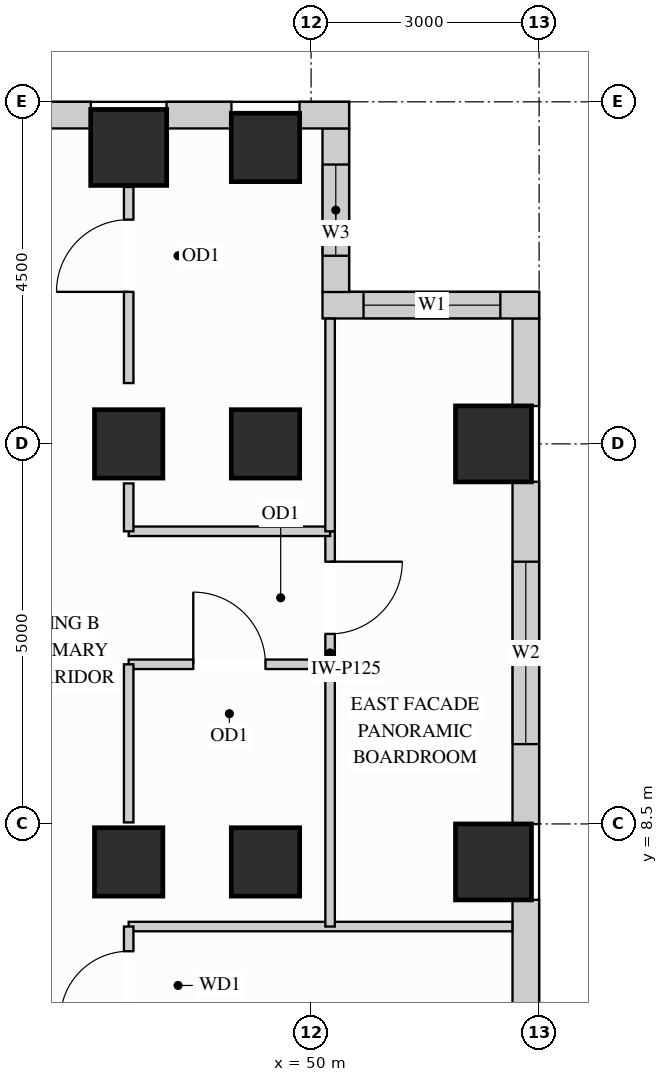
"""IFC4 building model, lengths in metres.
Left out: names, types, materials, properties, quantities, classifications, styles, units other than length and angle.
Written with IfcOpenShell. Run it as: python <this file> out.ifc"""

import sys

from ifc_helpers import new_model, si_unit, direction, frame, frame_2d, origin, origin_2d, place, context, subcontext, project, spatial, rectangle, extrude, source, transform, mapped, element, fill, save


model = new_model("IFC4")
c1 = context("Model", 3, precision=1e-05, world=origin(), true_north=direction((0.0, 1.0)))
c2 = subcontext(c1, "Body", "Model", "MODEL_VIEW")
j1 = project(units=[si_unit("LENGTHUNIT", "METRE"), si_unit("PLANEANGLEUNIT", "RADIAN")], contexts=[c1])
p1 = place(None, origin())
s1 = spatial("IfcSite", under=j1, at=p1, CompositionType="ELEMENT")
p2 = place(p1, origin())
s2 = spatial("IfcBuilding", under=s1, at=p2, CompositionType="ELEMENT")
p3 = place(p2, frame((0.0, 0.0, 146.7)))
s3 = spatial("IfcBuildingStorey", under=s2, at=p3, CompositionType="ELEMENT", Elevation=146.7)
m1 = source(origin(), c2, "Body", "SweptSolid", [
    extrude(rectangle(XDim=0.9, YDim=0.9, at=origin_2d()), origin(), (0.0, 0.0, 1.0), 3.4),
])
for number, where, z_axis, x_axis in (
    (1, (47.6, 13.5, 0.0), (0.0, 0.0, 1.0), (1.0, 0.0, 0.0)),
    (2, (47.6, 8.0, 0.0), (0.0, 0.0, 1.0), (1.0, 0.0, 0.0)),
    (3, (49.4, 13.5, 0.0), (0.0, 0.0, 1.0), (1.0, 0.0, 0.0)),
    (4, (49.4, 17.4, 0.0), (0.0, 0.0, 1.0), (1.0, 0.0, 0.0)),
    (5, (49.4, 8.0, 0.0), (0.0, 0.0, 1.0), (1.0, 0.0, 0.0)),
):
    element("IfcColumn", number, at=place(p3, frame(where, z_axis=z_axis, x_axis=x_axis)), inside=s3, PredefinedType="COLUMN", context=c2, shape_type="MappedRepresentation", body=[
        mapped(m1, transform((0.0, 0.0, 0.0), x_axis=(1.0, 0.0, 0.0), y_axis=(0.0, 1.0, 0.0), z_axis=(0.0, 0.0, 1.0))),
    ])
m2 = source(origin(), c2, "Body", "SweptSolid", [
    extrude(rectangle(XDim=1.0, YDim=1.0, at=origin_2d()), origin(), (0.0, 0.0, 1.0), 3.4),
])
for number, where, z_axis, x_axis in (
    (6, (47.6, 17.4, 0.0), (0.0, 0.0, 1.0), (1.0, 0.0, 0.0)),
    (7, (52.4, 13.5, 0.0), (0.0, 0.0, 1.0), (1.0, 0.0, 0.0)),
    (8, (52.4, 8.0, 0.0), (0.0, 0.0, 1.0), (1.0, 0.0, 0.0)),
):
    element("IfcColumn", number, at=place(p3, frame(where, z_axis=z_axis, x_axis=x_axis)), inside=s3, PredefinedType="COLUMN", context=c2, shape_type="MappedRepresentation", body=[
        mapped(m2, transform((0.0, 0.0, 0.0), x_axis=(1.0, 0.0, 0.0), y_axis=(0.0, 1.0, 0.0), z_axis=(0.0, 0.0, 1.0))),
    ])
m3 = source(origin(), c2, "Body", "SweptSolid", [
    extrude(rectangle(XDim=3.504, YDim=0.35, at=frame_2d((1.752, 0.0))), origin(), (0.0, 0.0, 1.0), 2.612),
])
p4 = place(p3, frame((52.825, 3.998, 0.0), z_axis=(0.0, 0.0, 1.0), x_axis=(0.0, 1.0, 0.0)))
e9 = element("IfcWall", 9, at=p4, inside=s3, PredefinedType="SOLIDWALL", context=c2, shape_type="MappedRepresentation", body=[
    mapped(m3, transform((0.0, 0.0, 0.0), x_axis=(1.0, 0.0, 0.0), y_axis=(0.0, 1.0, 0.0), z_axis=(0.0, 0.0, 1.0))),
])
p5 = place(p3, frame((52.825, 8.498, 0.0), z_axis=(0.0, 0.0, 1.0), x_axis=(0.0, 1.0, 0.0)))
e10 = element("IfcWall", 10, at=p5, inside=s3, PredefinedType="SOLIDWALL", context=c2, shape_type="SweptSolid", body=[
    extrude(rectangle(XDim=4.504, YDim=0.35, at=frame_2d((2.252, 0.0))), origin(), (0.0, 0.0, 1.0), 2.612),
])
p6 = place(p5, frame((1.052, 0.0, 0.78)))
e11 = element("IfcOpeningElement", 11, at=p6, cuts=e10, PredefinedType="OPENING", context=c2, shape_type="SweptSolid", body=[
    extrude(rectangle(XDim=2.4, YDim=1.652, at=frame_2d((1.2, 0.826))), frame((0.0, 0.185, 0.0), z_axis=(0.0, -1.0, 0.0), x_axis=(1.0, 0.0, 0.0)), (0.0, 0.0, 1.0), 0.37),
])
m4 = source(origin(), c2, "Body", "SweptSolid", [
    extrude(rectangle(XDim=1.154, YDim=0.35, at=frame_2d((0.577, 0.0))), origin(), (0.0, 0.0, 1.0), 3.385),
])
p7 = place(p3, frame((52.825, 13.998, 0.0), z_axis=(0.0, 0.0, 1.0), x_axis=(0.0, 1.0, 0.0)))
e12 = element("IfcWall", 12, at=p7, inside=s3, PredefinedType="SOLIDWALL", context=c2, shape_type="MappedRepresentation", body=[
    mapped(m4, transform((0.0, 0.0, 0.0), x_axis=(1.0, 0.0, 0.0), y_axis=(0.0, 1.0, 0.0), z_axis=(0.0, 0.0, 1.0))),
])
p8 = place(p3, frame((53.0, 15.325, 0.0), z_axis=(0.0, 0.0, 1.0), x_axis=(-1.0, 0.0, 0.0)))
e13 = element("IfcWall", 13, at=p8, inside=s3, PredefinedType="SOLIDWALL", context=c2, shape_type="SweptSolid", body=[
    extrude(rectangle(XDim=2.85, YDim=0.35, at=frame_2d((1.425, 0.0))), origin(), (0.0, 0.0, 1.0), 3.385),
])
p9 = place(p8, frame((0.51, 0.0, 0.78)))
e14 = element("IfcOpeningElement", 14, at=p9, cuts=e13, PredefinedType="OPENING", context=c2, shape_type="SweptSolid", body=[
    extrude(rectangle(XDim=1.8, YDim=2.1, at=frame_2d((0.9, 1.05))), frame((0.0, 0.185, 0.0), z_axis=(0.0, -1.0, 0.0), x_axis=(1.0, 0.0, 0.0)), (0.0, 0.0, 1.0), 0.37),
])
p10 = place(p3, frame((50.325, 15.498, 0.0), z_axis=(0.0, 0.0, 1.0), x_axis=(0.0, 1.0, 0.0)))
e15 = element("IfcWall", 15, at=p10, inside=s3, PredefinedType="SOLIDWALL", context=c2, shape_type="SweptSolid", body=[
    extrude(rectangle(XDim=2.154, YDim=0.35, at=frame_2d((1.077, 0.0))), origin(), (0.0, 0.0, 1.0), 3.385),
])
p11 = place(p10, frame((0.477, 0.0, 0.78)))
e16 = element("IfcOpeningElement", 16, at=p11, cuts=e15, PredefinedType="OPENING", context=c2, shape_type="SweptSolid", body=[
    extrude(rectangle(XDim=1.2, YDim=2.1, at=frame_2d((0.6, 1.05))), frame((0.0, 0.185, 0.0), z_axis=(0.0, -1.0, 0.0), x_axis=(1.0, 0.0, 0.0)), (0.0, 0.0, 1.0), 0.37),
])
m5 = source(origin(), c2, "Body", "SweptSolid", [
    extrude(rectangle(XDim=0.652, YDim=0.35, at=frame_2d((0.326, 0.0))), origin(), (0.0, 0.0, 1.0), 3.385),
])
p12 = place(p3, frame((50.5, 17.825, 0.0), z_axis=(0.0, 0.0, 1.0), x_axis=(-1.0, 0.0, 0.0)))
e17 = element("IfcWall", 17, at=p12, inside=s3, PredefinedType="SOLIDWALL", context=c2, shape_type="MappedRepresentation", body=[
    mapped(m5, transform((0.0, 0.0, 0.0), x_axis=(1.0, 0.0, 0.0), y_axis=(0.0, 1.0, 0.0), z_axis=(0.0, 0.0, 1.0))),
])
m6 = source(origin(), c2, "Body", "SweptSolid", [
    extrude(rectangle(XDim=0.854, YDim=0.35, at=frame_2d((0.427, 0.0))), origin(), (0.0, 0.0, 1.0), 3.385),
])
p13 = place(p3, frame((48.952, 17.825, 0.0), z_axis=(0.0, 0.0, 1.0), x_axis=(-1.0, 0.0, 0.0)))
e18 = element("IfcWall", 18, at=p13, inside=s3, PredefinedType="SOLIDWALL", context=c2, shape_type="MappedRepresentation", body=[
    mapped(m6, transform((0.0, 0.0, 0.0), x_axis=(1.0, 0.0, 0.0), y_axis=(0.0, 1.0, 0.0), z_axis=(0.0, 0.0, 1.0))),
])
p14 = place(p3, frame((47.102, 17.825, 0.0), z_axis=(0.0, 0.0, 1.0), x_axis=(-1.0, 0.0, 0.0)))
e19 = element("IfcWall", 19, at=p14, inside=s3, PredefinedType="SOLIDWALL", context=c2, shape_type="SweptSolid", body=[
    extrude(rectangle(XDim=6.604, YDim=0.35, at=frame_2d((3.302, 0.0))), origin(), (0.0, 0.0, 1.0), 2.612),
])
p15 = place(p14, frame((1.849, 0.0, 0.78)))
e20 = element("IfcOpeningElement", 20, at=p15, cuts=e19, PredefinedType="OPENING", context=c2, shape_type="SweptSolid", body=[
    extrude(rectangle(XDim=1.8, YDim=1.652, at=frame_2d((0.9, 0.826))), frame((0.0, 0.185, 0.0), z_axis=(0.0, -1.0, 0.0), x_axis=(1.0, 0.0, 0.0)), (0.0, 0.0, 1.0), 0.37),
])
p16 = place(p14, frame((4.067, 0.0, 0.78)))
e21 = element("IfcOpeningElement", 21, at=p16, cuts=e19, PredefinedType="OPENING", context=c2, shape_type="SweptSolid", body=[
    extrude(rectangle(XDim=1.8, YDim=1.652, at=frame_2d((0.9, 0.826))), frame((0.0, 0.185, 0.0), z_axis=(0.0, -1.0, 0.0), x_axis=(1.0, 0.0, 0.0)), (0.0, 0.0, 1.0), 0.37),
])
p17 = place(p3, frame((50.25, 10.6, 0.0), z_axis=(0.0, 0.0, 1.0), x_axis=(0.0, 1.0, 0.0)))
e22 = element("IfcWall", 22, at=p17, inside=s3, PredefinedType="PARTITIONING", context=c2, shape_type="SweptSolid", body=[
    extrude(rectangle(XDim=1.75, YDim=0.125, at=frame_2d((0.875, 0.0))), origin(), (0.0, 0.0, 1.0), 3.385),
])
p18 = place(p17, frame((0.4, 0.0, 0.0)))
e23 = element("IfcOpeningElement", 23, at=p18, cuts=e22, PredefinedType="OPENING", context=c2, shape_type="SweptSolid", body=[
    extrude(rectangle(XDim=0.95, YDim=2.15, at=frame_2d((0.475, 1.075))), frame((0.0, 0.073, 0.0), z_axis=(0.0, -1.0, 0.0), x_axis=(1.0, 0.0, 0.0)), (0.0, 0.0, 1.0), 0.145),
])
m7 = source(origin(), c2, "Body", "SweptSolid", [
    extrude(rectangle(XDim=5.048, YDim=0.125, at=frame_2d((2.524, 0.0))), origin(), (0.0, 0.0, 1.0), 3.385),
])
p19 = place(p3, frame((47.6, 7.15, 0.0), z_axis=(0.0, 0.0, 1.0), x_axis=(1.0, 0.0, 0.0)))
e24 = element("IfcWall", 24, at=p19, inside=s3, PredefinedType="PARTITIONING", context=c2, shape_type="MappedRepresentation", body=[
    mapped(m7, transform((0.0, 0.0, 0.0), x_axis=(1.0, 0.0, 0.0), y_axis=(0.0, 1.0, 0.0), z_axis=(0.0, 0.0, 1.0))),
])
m8 = source(origin(), c2, "Body", "SweptSolid", [
    extrude(rectangle(XDim=2.65, YDim=0.125, at=frame_2d((1.325, 0.0))), origin(), (0.0, 0.0, 1.0), 3.385),
])
p20 = place(p3, frame((47.6, 12.35, 0.0), z_axis=(0.0, 0.0, 1.0), x_axis=(1.0, 0.0, 0.0)))
e25 = element("IfcWall", 25, at=p20, inside=s3, PredefinedType="PARTITIONING", context=c2, shape_type="MappedRepresentation", body=[
    mapped(m8, transform((0.0, 0.0, 0.0), x_axis=(1.0, 0.0, 0.0), y_axis=(0.0, 1.0, 0.0), z_axis=(0.0, 0.0, 1.0))),
])
p21 = place(p3, frame((47.6, 10.6, 0.0), z_axis=(0.0, 0.0, 1.0), x_axis=(1.0, 0.0, 0.0)))
e26 = element("IfcWall", 26, at=p21, inside=s3, PredefinedType="PARTITIONING", context=c2, shape_type="SweptSolid", body=[
    extrude(rectangle(XDim=2.65, YDim=0.125, at=frame_2d((1.325, 0.0))), origin(), (0.0, 0.0, 1.0), 2.773),
])
p22 = place(p21, frame((0.85, 0.0, 0.0)))
e27 = element("IfcOpeningElement", 27, at=p22, cuts=e26, PredefinedType="OPENING", context=c2, shape_type="SweptSolid", body=[
    extrude(rectangle(XDim=0.95, YDim=2.15, at=frame_2d((0.475, 1.075))), frame((0.0, 0.073, 0.0), z_axis=(0.0, -1.0, 0.0), x_axis=(1.0, 0.0, 0.0)), (0.0, 0.0, 1.0), 0.145),
])
m9 = source(origin(), c2, "Body", "SweptSolid", [
    extrude(rectangle(XDim=3.45, YDim=0.125, at=frame_2d((1.725, 0.0))), origin(), (0.0, 0.0, 1.0), 3.385),
])
p23 = place(p3, frame((50.25, 7.15, 0.0), z_axis=(0.0, 0.0, 1.0), x_axis=(0.0, 1.0, 0.0)))
e28 = element("IfcWall", 28, at=p23, inside=s3, PredefinedType="PARTITIONING", context=c2, shape_type="MappedRepresentation", body=[
    mapped(m9, transform((0.0, 0.0, 0.0), x_axis=(1.0, 0.0, 0.0), y_axis=(0.0, 1.0, 0.0), z_axis=(0.0, 0.0, 1.0))),
])
m10 = source(origin(), c2, "Body", "SweptSolid", [
    extrude(rectangle(XDim=2.798, YDim=0.125, at=frame_2d((1.399, 0.0))), origin(), (0.0, 0.0, 1.0), 3.385),
])
p24 = place(p3, frame((50.25, 12.35, 0.0), z_axis=(0.0, 0.0, 1.0), x_axis=(0.0, 1.0, 0.0)))
e29 = element("IfcWall", 29, at=p24, inside=s3, PredefinedType="PARTITIONING", context=c2, shape_type="MappedRepresentation", body=[
    mapped(m10, transform((0.0, 0.0, 0.0), x_axis=(1.0, 0.0, 0.0), y_axis=(0.0, 1.0, 0.0), z_axis=(0.0, 0.0, 1.0))),
])
m11 = source(origin(), c2, "Body", "SweptSolid", [
    extrude(rectangle(XDim=2.08, YDim=0.125, at=frame_2d((1.04, 0.0))), origin(), (0.0, 0.0, 1.0), 2.773),
])
p25 = place(p3, frame((47.6, 8.52, 0.0), z_axis=(0.0, 0.0, 1.0), x_axis=(0.0, 1.0, 0.0)))
e30 = element("IfcWall", 30, at=p25, inside=s3, PredefinedType="PARTITIONING", context=c2, shape_type="MappedRepresentation", body=[
    mapped(m11, transform((0.0, 0.0, 0.0), x_axis=(1.0, 0.0, 0.0), y_axis=(0.0, 1.0, 0.0), z_axis=(0.0, 0.0, 1.0))),
])
p26 = place(p3, frame((47.6, 14.3, 0.0), z_axis=(0.0, 0.0, 1.0), x_axis=(0.0, 1.0, 0.0)))
e31 = element("IfcWall", 31, at=p26, inside=s3, PredefinedType="PARTITIONING", context=c2, shape_type="SweptSolid", body=[
    extrude(rectangle(XDim=2.58, YDim=0.125, at=frame_2d((1.29, 0.0))), origin(), (0.0, 0.0, 1.0), 2.773),
])
p27 = place(p26, frame((1.2, 0.0, 0.0)))
e32 = element("IfcOpeningElement", 32, at=p27, cuts=e31, PredefinedType="OPENING", context=c2, shape_type="SweptSolid", body=[
    extrude(rectangle(XDim=0.95, YDim=2.15, at=frame_2d((0.475, 1.075))), frame((0.0, 0.073, 0.0), z_axis=(0.0, -1.0, 0.0), x_axis=(1.0, 0.0, 0.0)), (0.0, 0.0, 1.0), 0.145),
])
m12 = source(origin(), c2, "Body", "SweptSolid", [
    extrude(rectangle(XDim=0.63, YDim=0.125, at=frame_2d((0.315, 0.0))), origin(), (0.0, 0.0, 1.0), 2.773),
])
p28 = place(p3, frame((47.6, 12.35, 0.0), z_axis=(0.0, 0.0, 1.0), x_axis=(0.0, 1.0, 0.0)))
e33 = element("IfcWall", 33, at=p28, inside=s3, PredefinedType="PARTITIONING", context=c2, shape_type="MappedRepresentation", body=[
    mapped(m12, transform((0.0, 0.0, 0.0), x_axis=(1.0, 0.0, 0.0), y_axis=(0.0, 1.0, 0.0), z_axis=(0.0, 0.0, 1.0))),
])
p29 = place(p3, frame((47.6, 5.65, 0.0), z_axis=(0.0, 0.0, 1.0), x_axis=(0.0, 1.0, 0.0)))
e34 = element("IfcWall", 34, at=p29, inside=s3, PredefinedType="PARTITIONING", context=c2, shape_type="SweptSolid", body=[
    extrude(rectangle(XDim=1.5, YDim=0.125, at=frame_2d((0.75, 0.0))), origin(), (0.0, 0.0, 1.0), 2.773),
])
p30 = place(p29, frame((0.275, 0.0, 0.0)))
e35 = element("IfcOpeningElement", 35, at=p30, cuts=e34, PredefinedType="OPENING", context=c2, shape_type="SweptSolid", body=[
    extrude(rectangle(XDim=0.9, YDim=2.15, at=frame_2d((0.45, 1.075))), frame((0.0, 0.073, 0.0), z_axis=(0.0, -1.0, 0.0), x_axis=(1.0, 0.0, 0.0)), (0.0, 0.0, 1.0), 0.145),
])
m13 = source(origin(), c2, "Body", "SweptSolid", [
    extrude(rectangle(XDim=0.95, YDim=2.15, at=frame_2d((0.475, 1.075))), frame((0.0, 0.025, 0.0), z_axis=(0.0, -1.0, 0.0), x_axis=(1.0, 0.0, 0.0)), (0.0, 0.0, 1.0), 0.05),
])
p31 = place(p22, origin())
e36 = element("IfcDoor", 36, at=p31, inside=s3, OperationType="SINGLE_SWING_LEFT", PredefinedType="DOOR", context=c2, shape_type="MappedRepresentation", body=[
    mapped(m13, transform((0.0, 0.0, 0.0), x_axis=(1.0, 0.0, 0.0), y_axis=(0.0, 1.0, 0.0), z_axis=(0.0, 0.0, 1.0))),
])
fill(e27, e36)
p32 = place(p18, origin())
e37 = element("IfcDoor", 37, at=p32, inside=s3, OperationType="SINGLE_SWING_RIGHT", PredefinedType="DOOR", context=c2, shape_type="MappedRepresentation", body=[
    mapped(m13, transform((0.0, 0.0, 0.0), x_axis=(1.0, 0.0, 0.0), y_axis=(0.0, 1.0, 0.0), z_axis=(0.0, 0.0, 1.0))),
])
fill(e23, e37)
p33 = place(p27, origin())
e38 = element("IfcDoor", 38, at=p33, inside=s3, OperationType="SINGLE_SWING_LEFT", PredefinedType="DOOR", context=c2, shape_type="MappedRepresentation", body=[
    mapped(m13, transform((0.0, 0.0, 0.0), x_axis=(1.0, 0.0, 0.0), y_axis=(0.0, 1.0, 0.0), z_axis=(0.0, 0.0, 1.0))),
])
fill(e32, e38)
m14 = source(origin(), c2, "Body", "SweptSolid", [
    extrude(rectangle(XDim=0.9, YDim=2.15, at=frame_2d((0.45, 1.075))), frame((0.0, 0.025, 0.0), z_axis=(0.0, -1.0, 0.0), x_axis=(1.0, 0.0, 0.0)), (0.0, 0.0, 1.0), 0.05),
])
p34 = place(p30, origin())
e39 = element("IfcDoor", 39, at=p34, inside=s3, OperationType="SINGLE_SWING_LEFT", PredefinedType="DOOR", context=c2, shape_type="MappedRepresentation", body=[
    mapped(m14, transform((0.0, 0.0, 0.0), x_axis=(1.0, 0.0, 0.0), y_axis=(0.0, 1.0, 0.0), z_axis=(0.0, 0.0, 1.0))),
])
fill(e35, e39)
m15 = source(origin(), c2, "Body", "SweptSolid", [
    extrude(rectangle(XDim=1.8, YDim=2.1, at=frame_2d((0.9, 1.05))), frame((0.0, 0.03, 0.0), z_axis=(0.0, -1.0, 0.0), x_axis=(1.0, 0.0, 0.0)), (0.0, 0.0, 1.0), 0.06),
])
p35 = place(p9, origin())
e40 = element("IfcWindow", 40, at=p35, inside=s3, PartitioningType="SINGLE_PANEL", PredefinedType="WINDOW", context=c2, shape_type="MappedRepresentation", body=[
    mapped(m15, transform((0.0, 0.0, 0.0), x_axis=(1.0, 0.0, 0.0), y_axis=(0.0, 1.0, 0.0), z_axis=(0.0, 0.0, 1.0))),
])
fill(e14, e40)
m16 = source(origin(), c2, "Body", "SweptSolid", [
    extrude(rectangle(XDim=2.4, YDim=1.652, at=frame_2d((1.2, 0.826))), frame((0.0, 0.03, 0.0), z_axis=(0.0, -1.0, 0.0), x_axis=(1.0, 0.0, 0.0)), (0.0, 0.0, 1.0), 0.06),
])
p36 = place(p6, origin())
e41 = element("IfcWindow", 41, at=p36, inside=s3, PartitioningType="SINGLE_PANEL", PredefinedType="WINDOW", context=c2, shape_type="MappedRepresentation", body=[
    mapped(m16, transform((0.0, 0.0, 0.0), x_axis=(1.0, 0.0, 0.0), y_axis=(0.0, 1.0, 0.0), z_axis=(0.0, 0.0, 1.0))),
])
fill(e11, e41)
m17 = source(origin(), c2, "Body", "SweptSolid", [
    extrude(rectangle(XDim=1.2, YDim=2.1, at=frame_2d((0.6, 1.05))), frame((0.0, 0.03, 0.0), z_axis=(0.0, -1.0, 0.0), x_axis=(1.0, 0.0, 0.0)), (0.0, 0.0, 1.0), 0.06),
])
p37 = place(p11, origin())
e42 = element("IfcWindow", 42, at=p37, inside=s3, PartitioningType="SINGLE_PANEL", PredefinedType="WINDOW", context=c2, shape_type="MappedRepresentation", body=[
    mapped(m17, transform((0.0, 0.0, 0.0), x_axis=(1.0, 0.0, 0.0), y_axis=(0.0, 1.0, 0.0), z_axis=(0.0, 0.0, 1.0))),
])
fill(e16, e42)
save(model, sys.argv[1])
